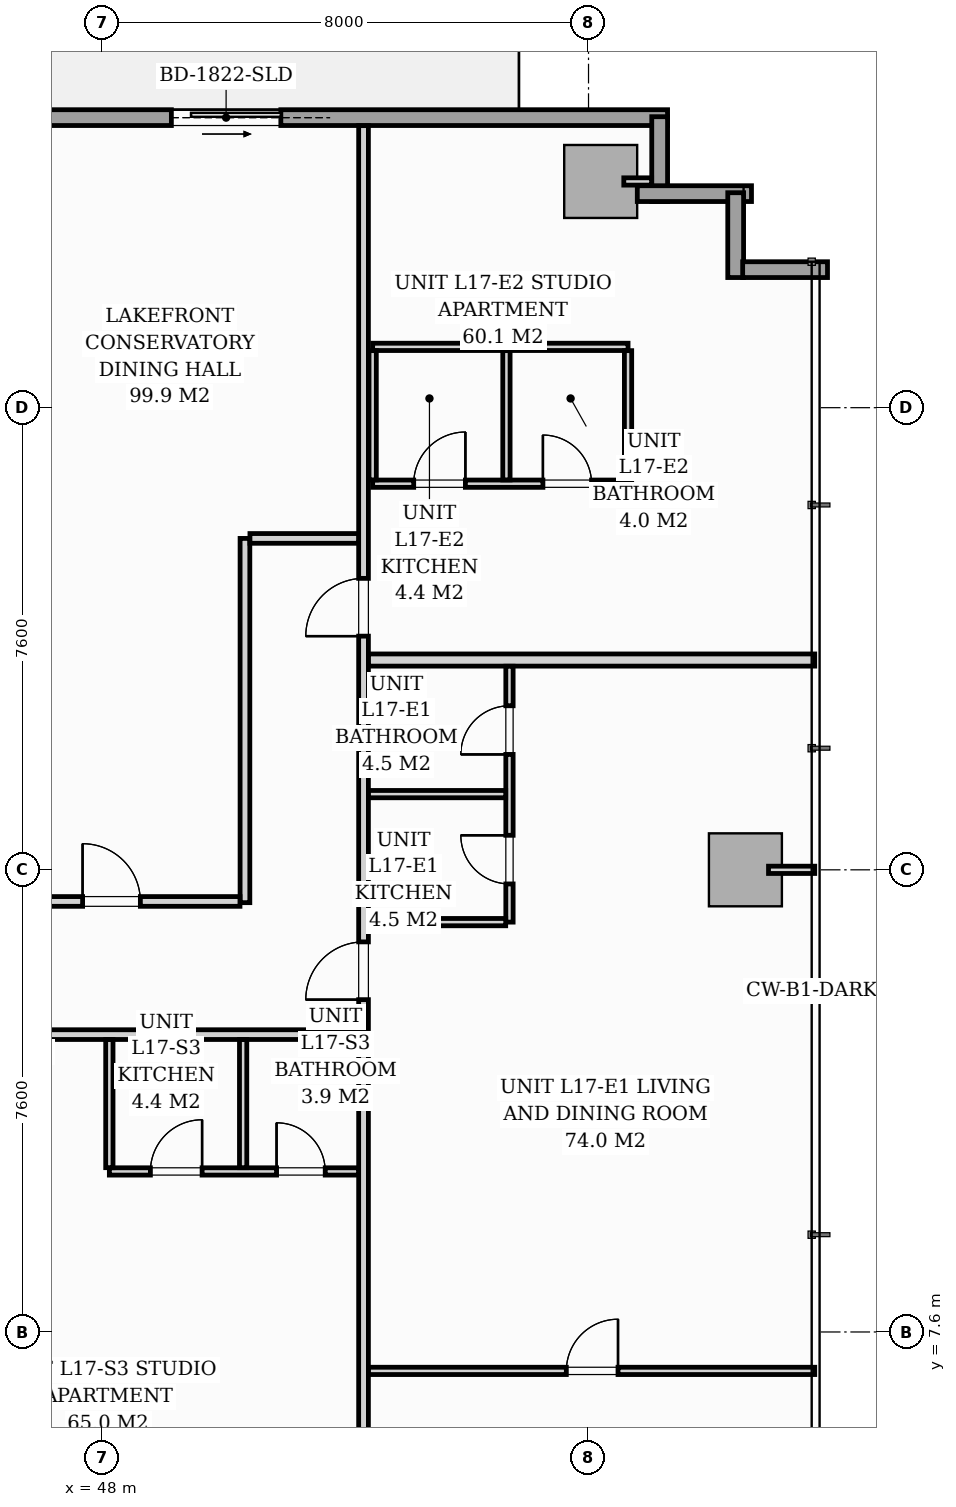
"""IFC4 building model, lengths in metres.
Left out: names, types, materials, properties, quantities, classifications, styles, units other than length and angle.
Written with IfcOpenShell. Run it as: python <this file> out.ifc"""

import sys

from ifc_helpers import new_model, si_unit, direction, frame, frame_2d, origin, origin_2d, place, context, subcontext, project, spatial, rectangle, extrude, source, transform, mapped, element, fill, save


model = new_model("IFC4")
c1 = context("Model", 3, precision=1e-05, world=origin(), true_north=direction((0.0, 1.0)))
c2 = subcontext(c1, "Body", "Model", "MODEL_VIEW")
j1 = project(units=[si_unit("LENGTHUNIT", "METRE"), si_unit("PLANEANGLEUNIT", "RADIAN")], contexts=[c1])
p1 = place(None, origin())
s1 = spatial("IfcSite", under=j1, at=p1, CompositionType="ELEMENT")
p2 = place(p1, origin())
s2 = spatial("IfcBuilding", under=s1, at=p2, CompositionType="ELEMENT")
p3 = place(p2, frame((0.0, 0.0, 61.4)))
s3 = spatial("IfcBuildingStorey", under=s2, at=p3, CompositionType="ELEMENT", Elevation=61.4)
m1 = source(origin(), c2, "Body", "SweptSolid", [
    extrude(rectangle(XDim=1.2, YDim=1.2, at=origin_2d()), origin(), (0.0, 0.0, 1.0), 3.196),
])
for number, where, z_axis, x_axis in (
    (1, (56.2, 26.52, 0.002), (0.0, 0.0, 1.0), (1.0, 0.0, 0.0)),
    (2, (58.58, 15.2, 0.002), (0.0, 0.0, 1.0), (1.0, 0.0, 0.0)),
):
    element("IfcColumn", number, at=place(p3, frame(where, z_axis=z_axis, x_axis=x_axis)), inside=s3, PredefinedType="COLUMN", context=c2, shape_type="MappedRepresentation", body=[
        mapped(m1, transform((0.0, 0.0, 0.0), scale=1.0)),
    ])
p4 = place(p3, frame((40.15, 27.57, 0.0), z_axis=(0.0, 0.0, 1.0), x_axis=(1.0, 0.0, 0.0)))
e3 = element("IfcWall", 3, at=p4, inside=s3, PredefinedType="STANDARD", context=c2, shape_type="SweptSolid", body=[
    extrude(rectangle(XDim=17.15, YDim=0.26, at=frame_2d((8.575, 0.0))), origin(), (0.0, 0.0, 1.0), 2.94),
])
p5 = place(p4, frame((8.99, 0.0, 0.0)))
e4 = element("IfcOpeningElement", 4, at=p5, cuts=e3, PredefinedType="OPENING", context=c2, shape_type="SweptSolid", body=[
    extrude(rectangle(XDim=1.8, YDim=2.06, at=frame_2d((0.9, 1.03))), frame((0.0, 0.14, 0.0), z_axis=(0.0, -1.0, 0.0), x_axis=(1.0, 0.0, 0.0)), (0.0, 0.0, 1.0), 0.28),
])
p6 = place(p4, frame((0.7, 0.0, 0.65)))
e5 = element("IfcOpeningElement", 5, at=p6, cuts=e3, PredefinedType="OPENING", context=c2, shape_type="SweptSolid", body=[
    extrude(rectangle(XDim=1.6, YDim=1.5, at=frame_2d((0.8, 0.75))), frame((0.0, 0.14, 0.0), z_axis=(0.0, -1.0, 0.0), x_axis=(1.0, 0.0, 0.0)), (0.0, 0.0, 1.0), 0.28),
])
p7 = place(p3, frame((57.17, 27.585, 0.0), z_axis=(0.0, 0.0, 1.0), x_axis=(0.0, -1.0, 0.0)))
e6 = element("IfcWall", 6, at=p7, inside=s3, PredefinedType="STANDARD", context=c2, shape_type="SweptSolid", body=[
    extrude(rectangle(XDim=1.395, YDim=0.26, at=frame_2d((0.698, 0.0))), origin(), (0.0, 0.0, 1.0), 2.94),
])
p8 = place(p3, frame((56.802, 26.32, 0.0), z_axis=(0.0, 0.0, 1.0), x_axis=(1.0, 0.0, 0.0)))
e7 = element("IfcWall", 7, at=p8, inside=s3, PredefinedType="STANDARD", context=c2, shape_type="SweptSolid", body=[
    extrude(rectangle(XDim=1.878, YDim=0.26, at=frame_2d((0.939, 0.0))), origin(), (0.0, 0.0, 1.0), 2.94),
])
for number, where, z_axis, x_axis in (
    (8, (58.42, 26.335, 0.0), (0.0, 0.0, 1.0), (0.0, -1.0, 0.0)),
    (9, (58.535, 25.07, 0.0), (0.0, 0.0, 1.0), (1.0, 0.0, 0.0)),
):
    element("IfcWall", number, at=place(p3, frame(where, z_axis=z_axis, x_axis=x_axis)), inside=s3, PredefinedType="STANDARD", context=c2, shape_type="SweptSolid", body=[
        extrude(rectangle(XDim=1.395, YDim=0.26, at=frame_2d((0.698, 0.0))), origin(), (0.0, 0.0, 1.0), 2.94),
    ])
p9 = place(p3, frame((15.2, 12.49, 0.0), z_axis=(0.0, 0.0, 1.0), x_axis=(1.0, 0.0, 0.0)))
e10 = element("IfcWall", 10, at=p9, inside=s3, PredefinedType="PARTITIONING", context=c2, shape_type="SweptSolid", body=[
    extrude(rectangle(XDim=37.1, YDim=0.16, at=frame_2d((18.55, 0.0))), origin(), (0.0, 0.0, 1.0), 2.94),
])
p10 = place(p9, frame((5.863, 0.0, 0.0)))
e11 = element("IfcOpeningElement", 11, at=p10, cuts=e10, PredefinedType="OPENING", context=c2, shape_type="SweptSolid", body=[
    extrude(rectangle(XDim=0.95, YDim=2.06, at=frame_2d((0.475, 1.03))), frame((0.0, 0.09, 0.0), z_axis=(0.0, -1.0, 0.0), x_axis=(1.0, 0.0, 0.0)), (0.0, 0.0, 1.0), 0.18),
])
p11 = place(p9, frame((18.25, 0.0, 0.0)))
e12 = element("IfcOpeningElement", 12, at=p11, cuts=e10, PredefinedType="OPENING", context=c2, shape_type="SweptSolid", body=[
    extrude(rectangle(XDim=0.95, YDim=2.06, at=frame_2d((0.475, 1.03))), frame((0.0, 0.09, 0.0), z_axis=(0.0, -1.0, 0.0), x_axis=(1.0, 0.0, 0.0)), (0.0, 0.0, 1.0), 0.18),
])
p12 = place(p9, frame((30.63, 0.0, 0.0)))
e13 = element("IfcOpeningElement", 13, at=p12, cuts=e10, PredefinedType="OPENING", context=c2, shape_type="SweptSolid", body=[
    extrude(rectangle(XDim=0.95, YDim=2.06, at=frame_2d((0.475, 1.03))), frame((0.0, 0.09, 0.0), z_axis=(0.0, -1.0, 0.0), x_axis=(1.0, 0.0, 0.0)), (0.0, 0.0, 1.0), 0.18),
])
p13 = place(p3, frame((52.3, 2.962, 0.0), z_axis=(0.0, 0.0, 1.0), x_axis=(0.0, 1.0, 0.0)))
e14 = element("IfcWall", 14, at=p13, inside=s3, PredefinedType="PARTITIONING", context=c2, shape_type="SweptSolid", body=[
    extrude(rectangle(XDim=9.446, YDim=0.16, at=frame_2d((4.723, 0.0))), origin(), (0.0, 0.0, 1.0), 2.94),
])
p14 = place(p3, frame((52.3, 12.572, 0.0), z_axis=(0.0, 0.0, 1.0), x_axis=(0.0, 1.0, 0.0)))
e15 = element("IfcWall", 15, at=p14, inside=s3, PredefinedType="PARTITIONING", context=c2, shape_type="SweptSolid", body=[
    extrude(rectangle(XDim=14.866, YDim=0.16, at=frame_2d((7.433, 0.0))), origin(), (0.0, 0.0, 1.0), 2.94),
])
p15 = place(p14, frame((0.493, 0.0, 0.0)))
e16 = element("IfcOpeningElement", 16, at=p15, cuts=e15, PredefinedType="OPENING", context=c2, shape_type="SweptSolid", body=[
    extrude(rectangle(XDim=0.95, YDim=2.06, at=frame_2d((0.475, 1.03))), frame((0.0, 0.09, 0.0), z_axis=(0.0, -1.0, 0.0), x_axis=(1.0, 0.0, 0.0)), (0.0, 0.0, 1.0), 0.18),
])
p16 = place(p14, frame((6.471, 0.0, 0.0)))
e17 = element("IfcOpeningElement", 17, at=p16, cuts=e15, PredefinedType="OPENING", context=c2, shape_type="SweptSolid", body=[
    extrude(rectangle(XDim=0.95, YDim=2.06, at=frame_2d((0.475, 1.03))), frame((0.0, 0.09, 0.0), z_axis=(0.0, -1.0, 0.0), x_axis=(1.0, 0.0, 0.0)), (0.0, 0.0, 1.0), 0.18),
])
p17 = place(p3, frame((48.12, 10.24, 0.0), z_axis=(0.0, 0.0, 1.0), x_axis=(1.0, 0.0, 0.0)))
e18 = element("IfcWall", 18, at=p17, inside=s3, PredefinedType="PARTITIONING", context=c2, shape_type="SweptSolid", body=[
    extrude(rectangle(XDim=4.098, YDim=0.12, at=frame_2d((2.049, 0.0))), origin(), (0.0, 0.0, 1.0), 2.94),
])
p18 = place(p17, frame((0.675, 0.0, 0.0)))
e19 = element("IfcOpeningElement", 19, at=p18, cuts=e18, PredefinedType="OPENING", context=c2, shape_type="SweptSolid", body=[
    extrude(rectangle(XDim=0.85, YDim=2.05, at=frame_2d((0.425, 1.025))), frame((0.0, 0.07, 0.0), z_axis=(0.0, -1.0, 0.0), x_axis=(1.0, 0.0, 0.0)), (0.0, 0.0, 1.0), 0.14),
])
p19 = place(p17, frame((2.75, 0.0, 0.0)))
e20 = element("IfcOpeningElement", 20, at=p19, cuts=e18, PredefinedType="OPENING", context=c2, shape_type="SweptSolid", body=[
    extrude(rectangle(XDim=0.8, YDim=2.02, at=frame_2d((0.4, 1.01))), frame((0.0, 0.07, 0.0), z_axis=(0.0, -1.0, 0.0), x_axis=(1.0, 0.0, 0.0)), (0.0, 0.0, 1.0), 0.14),
])
for number, where, z_axis, x_axis in (
    (21, (48.12, 10.302, 0.0), (0.0, 0.0, 1.0), (0.0, 1.0, 0.0)),
    (22, (50.32, 10.302, 0.0), (0.0, 0.0, 1.0), (0.0, 1.0, 0.0)),
):
    element("IfcWall", number, at=place(p3, frame(where, z_axis=z_axis, x_axis=x_axis)), inside=s3, PredefinedType="PARTITIONING", context=c2, shape_type="SweptSolid", body=[
        extrude(rectangle(XDim=2.106, YDim=0.12, at=frame_2d((1.053, 0.0))), origin(), (0.0, 0.0, 1.0), 2.94),
    ])
p20 = place(p3, frame((52.382, 18.65, 0.0), z_axis=(0.0, 0.0, 1.0), x_axis=(1.0, 0.0, 0.0)))
e23 = element("IfcWall", 23, at=p20, inside=s3, PredefinedType="PARTITIONING", context=c2, shape_type="SweptSolid", body=[
    extrude(rectangle(XDim=7.338, YDim=0.2, at=frame_2d((3.669, 0.0))), origin(), (0.0, 0.0, 1.0), 2.94),
])
p21 = place(p3, frame((54.7, 14.34, 0.0), z_axis=(0.0, 0.0, 1.0), x_axis=(0.0, 1.0, 0.0)))
e24 = element("IfcWall", 24, at=p21, inside=s3, PredefinedType="PARTITIONING", context=c2, shape_type="SweptSolid", body=[
    extrude(rectangle(XDim=4.208, YDim=0.12, at=frame_2d((2.104, 0.0))), origin(), (0.0, 0.0, 1.0), 2.94),
])
p22 = place(p21, frame((0.628, 0.0, 0.0)))
e25 = element("IfcOpeningElement", 25, at=p22, cuts=e24, PredefinedType="OPENING", context=c2, shape_type="SweptSolid", body=[
    extrude(rectangle(XDim=0.8, YDim=2.0, at=frame_2d((0.4, 1.0))), frame((0.0, 0.07, 0.0), z_axis=(0.0, -1.0, 0.0), x_axis=(1.0, 0.0, 0.0)), (0.0, 0.0, 1.0), 0.14),
])
p23 = place(p21, frame((2.758, 0.0, 0.0)))
e26 = element("IfcOpeningElement", 26, at=p23, cuts=e24, PredefinedType="OPENING", context=c2, shape_type="SweptSolid", body=[
    extrude(rectangle(XDim=0.8, YDim=2.02, at=frame_2d((0.4, 1.01))), frame((0.0, 0.07, 0.0), z_axis=(0.0, -1.0, 0.0), x_axis=(1.0, 0.0, 0.0)), (0.0, 0.0, 1.0), 0.14),
])
p24 = place(p3, frame((52.382, 16.445, 0.0), z_axis=(0.0, 0.0, 1.0), x_axis=(1.0, 0.0, 0.0)))
e27 = element("IfcWall", 27, at=p24, inside=s3, PredefinedType="PARTITIONING", context=c2, shape_type="SweptSolid", body=[
    extrude(rectangle(XDim=2.256, YDim=0.12, at=frame_2d((1.128, 0.0))), origin(), (0.0, 0.0, 1.0), 2.045),
])
p25 = place(p3, frame((52.382, 14.34, 0.0), z_axis=(0.0, 0.0, 1.0), x_axis=(1.0, 0.0, 0.0)))
e28 = element("IfcWall", 28, at=p25, inside=s3, PredefinedType="PARTITIONING", context=c2, shape_type="SweptSolid", body=[
    extrude(rectangle(XDim=2.256, YDim=0.12, at=frame_2d((1.128, 0.0))), origin(), (0.0, 0.0, 1.0), 2.94),
])
p26 = place(p3, frame((52.382, 6.96, 0.0), z_axis=(0.0, 0.0, 1.0), x_axis=(1.0, 0.0, 0.0)))
e29 = element("IfcWall", 29, at=p26, inside=s3, PredefinedType="PARTITIONING", context=c2, shape_type="SweptSolid", body=[
    extrude(rectangle(XDim=7.338, YDim=0.12, at=frame_2d((3.669, 0.0))), origin(), (0.0, 0.0, 1.0), 2.94),
])
p27 = place(p26, frame((3.253, 0.0, 0.0)))
e30 = element("IfcOpeningElement", 30, at=p27, cuts=e29, PredefinedType="OPENING", context=c2, shape_type="SweptSolid", body=[
    extrude(rectangle(XDim=0.85, YDim=2.05, at=frame_2d((0.425, 1.025))), frame((0.0, 0.07, 0.0), z_axis=(0.0, -1.0, 0.0), x_axis=(1.0, 0.0, 0.0)), (0.0, 0.0, 1.0), 0.14),
])
p28 = place(p3, frame((52.45, 21.55, 0.0), z_axis=(0.0, 0.0, 1.0), x_axis=(1.0, 0.0, 0.0)))
e31 = element("IfcWall", 31, at=p28, inside=s3, PredefinedType="PARTITIONING", context=c2, shape_type="SweptSolid", body=[
    extrude(rectangle(XDim=4.2, YDim=0.12, at=frame_2d((2.1, 0.0))), origin(), (0.0, 0.0, 1.0), 2.94),
])
p29 = place(p28, frame((0.675, 0.0, 0.0)))
e32 = element("IfcOpeningElement", 32, at=p29, cuts=e31, PredefinedType="OPENING", context=c2, shape_type="SweptSolid", body=[
    extrude(rectangle(XDim=0.85, YDim=2.05, at=frame_2d((0.425, 1.025))), frame((0.0, 0.07, 0.0), z_axis=(0.0, -1.0, 0.0), x_axis=(1.0, 0.0, 0.0)), (0.0, 0.0, 1.0), 0.14),
])
p30 = place(p28, frame((2.8, 0.0, 0.0)))
e33 = element("IfcOpeningElement", 33, at=p30, cuts=e31, PredefinedType="OPENING", context=c2, shape_type="SweptSolid", body=[
    extrude(rectangle(XDim=0.8, YDim=2.02, at=frame_2d((0.4, 1.01))), frame((0.0, 0.07, 0.0), z_axis=(0.0, -1.0, 0.0), x_axis=(1.0, 0.0, 0.0)), (0.0, 0.0, 1.0), 0.14),
])
p31 = place(p3, frame((52.45, 23.8, 0.0), z_axis=(0.0, 0.0, 1.0), x_axis=(1.0, 0.0, 0.0)))
e34 = element("IfcWall", 34, at=p31, inside=s3, PredefinedType="PARTITIONING", context=c2, shape_type="SweptSolid", body=[
    extrude(rectangle(XDim=4.2, YDim=0.12, at=frame_2d((2.1, 0.0))), origin(), (0.0, 0.0, 1.0), 2.94),
])
for number, where, z_axis, x_axis in (
    (35, (52.45, 21.612, 0.0), (0.0, 0.0, 1.0), (0.0, 1.0, 0.0)),
    (36, (54.65, 21.612, 0.0), (0.0, 0.0, 1.0), (0.0, 1.0, 0.0)),
    (37, (56.65, 21.612, 0.0), (0.0, 0.0, 1.0), (0.0, 1.0, 0.0)),
):
    element("IfcWall", number, at=place(p3, frame(where, z_axis=z_axis, x_axis=x_axis)), inside=s3, PredefinedType="PARTITIONING", context=c2, shape_type="SweptSolid", body=[
        extrude(rectangle(XDim=2.126, YDim=0.12, at=frame_2d((1.063, 0.0))), origin(), (0.0, 0.0, 1.0), 2.94),
    ])
p32 = place(p3, frame((50.35, 14.66, 0.0), z_axis=(0.0, 0.0, 1.0), x_axis=(0.0, 1.0, 0.0)))
e38 = element("IfcWall", 38, at=p32, inside=s3, PredefinedType="PARTITIONING", context=c2, shape_type="SweptSolid", body=[
    extrude(rectangle(XDim=5.99, YDim=0.16, at=frame_2d((2.995, 0.0))), origin(), (0.0, 0.0, 1.0), 2.94),
])
p33 = place(p3, frame((50.432, 20.65, 0.0), z_axis=(0.0, 0.0, 1.0), x_axis=(1.0, 0.0, 0.0)))
e39 = element("IfcWall", 39, at=p33, inside=s3, PredefinedType="PARTITIONING", context=c2, shape_type="SweptSolid", body=[
    extrude(rectangle(XDim=1.786, YDim=0.16, at=frame_2d((0.893, 0.0))), origin(), (0.0, 0.0, 1.0), 2.94),
])
p34 = place(p3, frame((45.84, 14.68, 0.0), z_axis=(0.0, 0.0, 1.0), x_axis=(1.0, 0.0, 0.0)))
e40 = element("IfcWall", 40, at=p34, inside=s3, PredefinedType="PARTITIONING", context=c2, shape_type="SweptSolid", body=[
    extrude(rectangle(XDim=4.428, YDim=0.16, at=frame_2d((2.214, 0.0))), origin(), (0.0, 0.0, 1.0), 2.94),
])
p35 = place(p34, frame((1.84, 0.0, 0.0)))
e41 = element("IfcOpeningElement", 41, at=p35, cuts=e40, PredefinedType="OPENING", context=c2, shape_type="SweptSolid", body=[
    extrude(rectangle(XDim=0.95, YDim=2.06, at=frame_2d((0.475, 1.03))), frame((0.0, 0.09, 0.0), z_axis=(0.0, -1.0, 0.0), x_axis=(1.0, 0.0, 0.0)), (0.0, 0.0, 1.0), 0.18),
])
p36 = place(p3, frame((56.58, 26.52, 0.0), z_axis=(0.0, 0.0, 1.0), x_axis=(1.0, 0.0, 0.0)))
e42 = element("IfcWall", 42, at=p36, inside=s3, PredefinedType="PARTITIONING", context=c2, shape_type="SweptSolid", body=[
    extrude(rectangle(XDim=0.458, YDim=0.12, at=frame_2d((0.229, 0.0))), origin(), (0.0, 0.0, 1.0), 2.94),
])
p37 = place(p3, frame((58.96, 15.2, 0.0), z_axis=(0.0, 0.0, 1.0), x_axis=(1.0, 0.0, 0.0)))
e43 = element("IfcWall", 43, at=p37, inside=s3, PredefinedType="PARTITIONING", context=c2, shape_type="SweptSolid", body=[
    extrude(rectangle(XDim=0.76, YDim=0.12, at=frame_2d((0.38, 0.0))), origin(), (0.0, 0.0, 1.0), 2.94),
])
m2 = source(origin(), c2, "Body", "SweptSolid", [
    extrude(rectangle(XDim=1.8, YDim=2.06, at=frame_2d((0.9, 1.03))), frame((0.0, 0.025, 0.0), z_axis=(0.0, -1.0, 0.0), x_axis=(1.0, 0.0, 0.0)), (0.0, 0.0, 1.0), 0.05),
])
p38 = place(p5, origin())
e44 = element("IfcDoor", 44, at=p38, inside=s3, OperationType="SLIDING_TO_RIGHT", PredefinedType="DOOR", context=c2, shape_type="MappedRepresentation", body=[
    mapped(m2, transform((0.0, 0.0, 0.0), scale=1.0)),
])
fill(e4, e44)
m3 = source(origin(), c2, "Body", "SweptSolid", [
    extrude(rectangle(XDim=0.85, YDim=2.05, at=frame_2d((0.425, 1.025))), frame((0.0, 0.025, 0.0), z_axis=(0.0, -1.0, 0.0), x_axis=(1.0, 0.0, 0.0)), (0.0, 0.0, 1.0), 0.05),
])
p39 = place(p18, origin())
e45 = element("IfcDoor", 45, at=p39, inside=s3, OperationType="SINGLE_SWING_RIGHT", PredefinedType="DOOR", context=c2, shape_type="MappedRepresentation", body=[
    mapped(m3, transform((0.0, 0.0, 0.0), scale=1.0)),
])
fill(e19, e45)
m4 = source(origin(), c2, "Body", "SweptSolid", [
    extrude(rectangle(XDim=0.8, YDim=2.02, at=frame_2d((0.4, 1.01))), frame((0.0, 0.025, 0.0), z_axis=(0.0, -1.0, 0.0), x_axis=(1.0, 0.0, 0.0)), (0.0, 0.0, 1.0), 0.05),
])
p40 = place(p19, origin())
e46 = element("IfcDoor", 46, at=p40, inside=s3, OperationType="SINGLE_SWING_LEFT", PredefinedType="DOOR", context=c2, shape_type="MappedRepresentation", body=[
    mapped(m4, transform((0.0, 0.0, 0.0), scale=1.0)),
])
fill(e20, e46)
m5 = source(origin(), c2, "Body", "SweptSolid", [
    extrude(rectangle(XDim=0.95, YDim=2.06, at=frame_2d((0.475, 1.03))), frame((0.0, 0.025, 0.0), z_axis=(0.0, -1.0, 0.0), x_axis=(1.0, 0.0, 0.0)), (0.0, 0.0, 1.0), 0.05),
])
p41 = place(p15, origin())
e47 = element("IfcDoor", 47, at=p41, inside=s3, OperationType="SINGLE_SWING_LEFT", PredefinedType="DOOR", context=c2, shape_type="MappedRepresentation", body=[
    mapped(m5, transform((0.0, 0.0, 0.0), scale=1.0)),
])
fill(e16, e47)
m6 = source(origin(), c2, "Body", "SweptSolid", [
    extrude(rectangle(XDim=0.8, YDim=2.0, at=frame_2d((0.4, 1.0))), frame((0.0, 0.025, 0.0), z_axis=(0.0, -1.0, 0.0), x_axis=(1.0, 0.0, 0.0)), (0.0, 0.0, 1.0), 0.05),
])
p42 = place(p22, origin())
e48 = element("IfcDoor", 48, at=p42, inside=s3, OperationType="SINGLE_SWING_RIGHT", PredefinedType="DOOR", context=c2, shape_type="MappedRepresentation", body=[
    mapped(m6, transform((0.0, 0.0, 0.0), scale=1.0)),
])
fill(e25, e48)
p43 = place(p23, origin())
e49 = element("IfcDoor", 49, at=p43, inside=s3, OperationType="SINGLE_SWING_LEFT", PredefinedType="DOOR", context=c2, shape_type="MappedRepresentation", body=[
    mapped(m4, transform((0.0, 0.0, 0.0), scale=1.0)),
])
fill(e26, e49)
p44 = place(p27, origin())
e50 = element("IfcDoor", 50, at=p44, inside=s3, OperationType="SINGLE_SWING_RIGHT", PredefinedType="DOOR", context=c2, shape_type="MappedRepresentation", body=[
    mapped(m3, transform((0.0, 0.0, 0.0), scale=1.0)),
])
fill(e30, e50)
p45 = place(p16, origin())
e51 = element("IfcDoor", 51, at=p45, inside=s3, OperationType="SINGLE_SWING_LEFT", PredefinedType="DOOR", context=c2, shape_type="MappedRepresentation", body=[
    mapped(m5, transform((0.0, 0.0, 0.0), scale=1.0)),
])
fill(e17, e51)
p46 = place(p29, origin())
e52 = element("IfcDoor", 52, at=p46, inside=s3, OperationType="SINGLE_SWING_RIGHT", PredefinedType="DOOR", context=c2, shape_type="MappedRepresentation", body=[
    mapped(m3, transform((0.0, 0.0, 0.0), scale=1.0)),
])
fill(e32, e52)
p47 = place(p30, origin())
e53 = element("IfcDoor", 53, at=p47, inside=s3, OperationType="SINGLE_SWING_LEFT", PredefinedType="DOOR", context=c2, shape_type="MappedRepresentation", body=[
    mapped(m4, transform((0.0, 0.0, 0.0), scale=1.0)),
])
fill(e33, e53)
p48 = place(p35, origin())
e54 = element("IfcDoor", 54, at=p48, inside=s3, OperationType="SINGLE_SWING_LEFT", PredefinedType="DOOR", context=c2, shape_type="MappedRepresentation", body=[
    mapped(m5, transform((0.0, 0.0, 0.0), scale=1.0)),
])
fill(e41, e54)
save(model, sys.argv[1])
